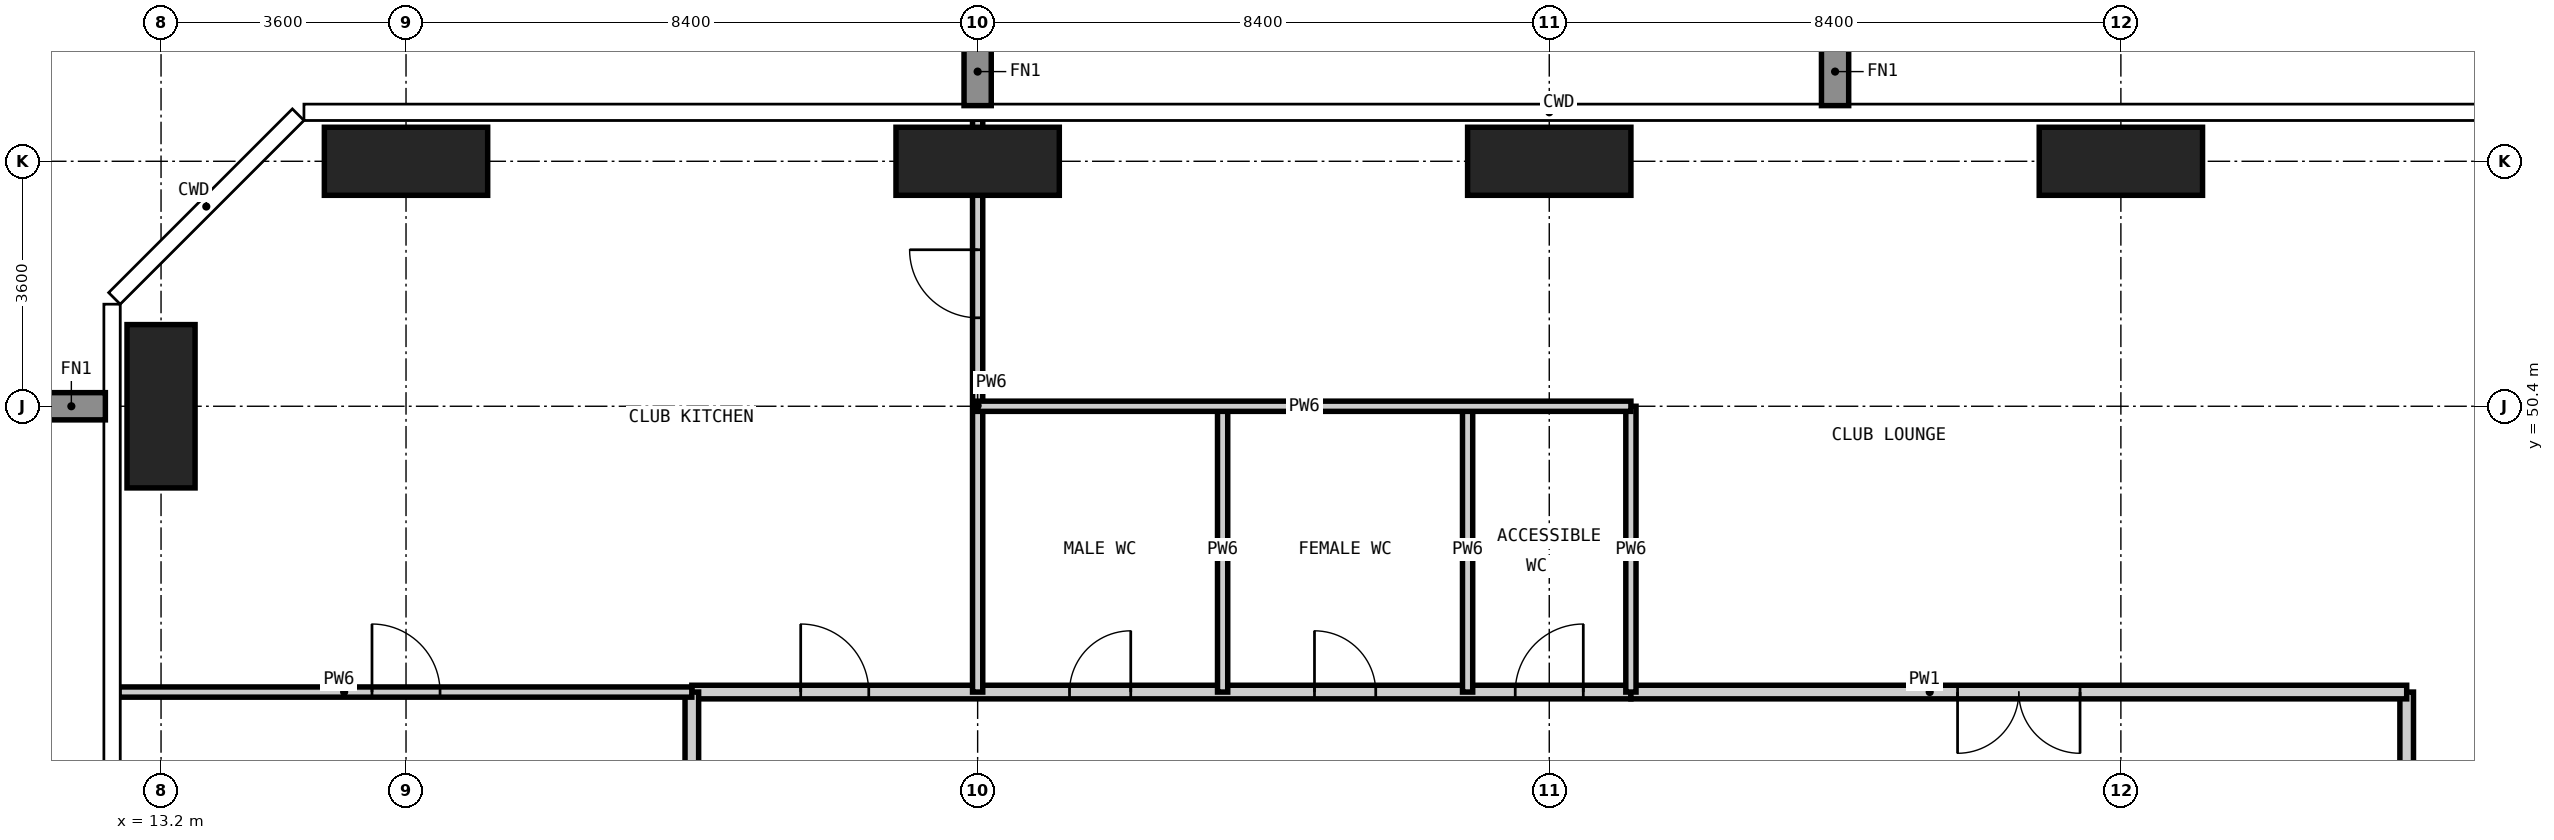
"""IFC4 building model, lengths in metres.
Left out: names, types, materials, properties, quantities, classifications, styles, units other than length and angle.
Written with IfcOpenShell. Run it as: python <this file> out.ifc"""

import sys

from ifc_helpers import new_model, si_unit, direction, frame, frame_2d, origin, origin_2d, place, context, subcontext, project, spatial, rectangle, extrude, element, fill, save


model = new_model("IFC4")
c1 = context("Model", 3, precision=1e-05, world=origin(), true_north=direction((0.0, 1.0)))
c2 = subcontext(c1, "Body", "Model", "MODEL_VIEW")
j1 = project(units=[si_unit("LENGTHUNIT", "METRE"), si_unit("PLANEANGLEUNIT", "RADIAN")], contexts=[c1])
p1 = place(None, origin())
s1 = spatial("IfcSite", under=j1, at=p1, CompositionType="ELEMENT")
p2 = place(p1, origin())
s2 = spatial("IfcBuilding", under=s1, at=p2, CompositionType="ELEMENT")
p3 = place(p2, frame((0.0, 0.0, 284.1)))
s3 = spatial("IfcBuildingStorey", under=s2, at=p3, CompositionType="ELEMENT", Elevation=284.1)
p4 = place(p3, frame((13.2, 50.4, -0.35), z_axis=(0.0, 0.0, 1.0), x_axis=(1.0, 0.0, 0.0)))
e1 = element("IfcColumn", 1, at=p4, inside=s3, PredefinedType="COLUMN", context=c2, shape_type="SweptSolid", body=[
    extrude(rectangle(XDim=1.0, YDim=2.4, at=origin_2d()), origin(), (0.0, 0.0, 1.0), 5.0),
])
for number, where, z_axis, x_axis in (
    (2, (16.8, 54.0, -0.35), (0.0, 0.0, 1.0), (1.0, 0.0, 0.0)),
    (3, (25.2, 54.0, -0.35), (0.0, 0.0, 1.0), (1.0, 0.0, 0.0)),
    (4, (33.6, 54.0, -0.35), (0.0, 0.0, 1.0), (1.0, 0.0, 0.0)),
    (5, (42.0, 54.0, -0.35), (0.0, 0.0, 1.0), (1.0, 0.0, 0.0)),
):
    element("IfcColumn", number, at=place(p3, frame(where, z_axis=z_axis, x_axis=x_axis)), inside=s3, PredefinedType="COLUMN", context=c2, shape_type="SweptSolid", body=[
        extrude(rectangle(XDim=2.4, YDim=1.0, at=origin_2d()), origin(), (0.0, 0.0, 1.0), 5.0),
    ])
p5 = place(p3, frame((46.2, 33.6, 0.0), z_axis=(0.0, 0.0, 1.0), x_axis=(0.0, 1.0, 0.0)))
e6 = element("IfcWall", 6, at=p5, inside=s3, PredefinedType="PARTITIONING", context=c2, shape_type="SweptSolid", body=[
    extrude(rectangle(XDim=12.6, YDim=0.2, at=frame_2d((6.3, 0.0))), origin(), (0.0, 0.0, 1.0), 4.65),
])
p6 = place(p5, frame((5.4, 0.0, 0.0)))
e7 = element("IfcOpeningElement", 7, at=p6, cuts=e6, PredefinedType="OPENING", context=c2, shape_type="SweptSolid", body=[
    extrude(rectangle(XDim=1.8, YDim=2.4, at=frame_2d((0.9, 1.2))), frame((0.0, 0.11, 0.0), z_axis=(0.0, -1.0, 0.0), x_axis=(1.0, 0.0, 0.0)), (0.0, 0.0, 1.0), 0.22),
])
p7 = place(p3, frame((21.0, 46.2, 0.0), z_axis=(0.0, 0.0, 1.0), x_axis=(1.0, 0.0, 0.0)))
e8 = element("IfcWall", 8, at=p7, inside=s3, PredefinedType="PARTITIONING", context=c2, shape_type="SweptSolid", body=[
    extrude(rectangle(XDim=13.8, YDim=0.2, at=frame_2d((6.9, 0.0))), origin(), (0.0, 0.0, 1.0), 4.65),
])
p8 = place(p7, frame((1.6, 0.0, 0.0)))
e9 = element("IfcOpeningElement", 9, at=p8, cuts=e8, PredefinedType="OPENING", context=c2, shape_type="SweptSolid", body=[
    extrude(rectangle(XDim=1.0, YDim=2.1, at=frame_2d((0.5, 1.05))), frame((0.0, 0.11, 0.0), z_axis=(0.0, -1.0, 0.0), x_axis=(1.0, 0.0, 0.0)), (0.0, 0.0, 1.0), 0.22),
])
p9 = place(p7, frame((5.55, 0.0, 0.0)))
e10 = element("IfcOpeningElement", 10, at=p9, cuts=e8, PredefinedType="OPENING", context=c2, shape_type="SweptSolid", body=[
    extrude(rectangle(XDim=0.9, YDim=2.1, at=frame_2d((0.45, 1.05))), frame((0.0, 0.11, 0.0), z_axis=(0.0, -1.0, 0.0), x_axis=(1.0, 0.0, 0.0)), (0.0, 0.0, 1.0), 0.22),
])
p10 = place(p7, frame((9.15, 0.0, 0.0)))
e11 = element("IfcOpeningElement", 11, at=p10, cuts=e8, PredefinedType="OPENING", context=c2, shape_type="SweptSolid", body=[
    extrude(rectangle(XDim=0.9, YDim=2.1, at=frame_2d((0.45, 1.05))), frame((0.0, 0.11, 0.0), z_axis=(0.0, -1.0, 0.0), x_axis=(1.0, 0.0, 0.0)), (0.0, 0.0, 1.0), 0.22),
])
p11 = place(p7, frame((12.1, 0.0, 0.0)))
e12 = element("IfcOpeningElement", 12, at=p11, cuts=e8, PredefinedType="OPENING", context=c2, shape_type="SweptSolid", body=[
    extrude(rectangle(XDim=1.0, YDim=2.1, at=frame_2d((0.5, 1.05))), frame((0.0, 0.11, 0.0), z_axis=(0.0, -1.0, 0.0), x_axis=(1.0, 0.0, 0.0)), (0.0, 0.0, 1.0), 0.22),
])
p12 = place(p3, frame((21.0, 46.2, 0.0), z_axis=(0.0, 0.0, 1.0), x_axis=(0.0, -1.0, 0.0)))
e13 = element("IfcWall", 13, at=p12, inside=s3, PredefinedType="PARTITIONING", context=c2, shape_type="SweptSolid", body=[
    extrude(rectangle(XDim=12.6, YDim=0.2, at=frame_2d((6.3, 0.0))), origin(), (0.0, 0.0, 1.0), 4.65),
])
p13 = place(p12, frame((5.4, 0.0, 0.0)))
e14 = element("IfcOpeningElement", 14, at=p13, cuts=e13, PredefinedType="OPENING", context=c2, shape_type="SweptSolid", body=[
    extrude(rectangle(XDim=1.8, YDim=2.4, at=frame_2d((0.9, 1.2))), frame((0.0, 0.11, 0.0), z_axis=(0.0, -1.0, 0.0), x_axis=(1.0, 0.0, 0.0)), (0.0, 0.0, 1.0), 0.22),
])
p14 = place(p3, frame((46.2, 46.2, 0.0), z_axis=(0.0, 0.0, 1.0), x_axis=(-1.0, 0.0, 0.0)))
e15 = element("IfcWall", 15, at=p14, inside=s3, PredefinedType="PARTITIONING", context=c2, shape_type="SweptSolid", body=[
    extrude(rectangle(XDim=11.4, YDim=0.2, at=frame_2d((5.7, 0.0))), origin(), (0.0, 0.0, 1.0), 4.65),
])
p15 = place(p14, frame((4.8, 0.0, 0.0)))
e16 = element("IfcOpeningElement", 16, at=p15, cuts=e15, PredefinedType="OPENING", context=c2, shape_type="SweptSolid", body=[
    extrude(rectangle(XDim=1.8, YDim=2.4, at=frame_2d((0.9, 1.2))), frame((0.0, 0.11, 0.0), z_axis=(0.0, -1.0, 0.0), x_axis=(1.0, 0.0, 0.0)), (0.0, 0.0, 1.0), 0.22),
])
p16 = place(p3, frame((25.2, 46.2, 0.0), z_axis=(0.0, 0.0, 1.0), x_axis=(0.0, 1.0, 0.0)))
e17 = element("IfcWall", 17, at=p16, inside=s3, PredefinedType="PARTITIONING", context=c2, shape_type="SweptSolid", body=[
    extrude(rectangle(XDim=8.418, YDim=0.15, at=frame_2d((4.209, 0.0))), origin(), (0.0, 0.0, 1.0), 4.65),
])
p17 = place(p16, frame((5.5, 0.0, 0.0)))
e18 = element("IfcOpeningElement", 18, at=p17, cuts=e17, PredefinedType="OPENING", context=c2, shape_type="SweptSolid", body=[
    extrude(rectangle(XDim=1.0, YDim=2.1, at=frame_2d((0.5, 1.05))), frame((0.0, 0.085, 0.0), z_axis=(0.0, -1.0, 0.0), x_axis=(1.0, 0.0, 0.0)), (0.0, 0.0, 1.0), 0.17),
])
for number, where, z_axis, x_axis in (
    (19, (28.8, 46.2, 0.0), (0.0, 0.0, 1.0), (0.0, 1.0, 0.0)),
    (20, (32.4, 46.2, 0.0), (0.0, 0.0, 1.0), (0.0, 1.0, 0.0)),
    (21, (34.8, 46.2, 0.0), (0.0, 0.0, 1.0), (0.0, 1.0, 0.0)),
):
    element("IfcWall", number, at=place(p3, frame(where, z_axis=z_axis, x_axis=x_axis)), inside=s3, PredefinedType="PARTITIONING", context=c2, shape_type="SweptSolid", body=[
        extrude(rectangle(XDim=4.2, YDim=0.15, at=frame_2d((2.1, 0.0))), origin(), (0.0, 0.0, 1.0), 4.65),
    ])
p18 = place(p3, frame((12.582, 46.2, 0.0), z_axis=(0.0, 0.0, 1.0), x_axis=(1.0, 0.0, 0.0)))
e22 = element("IfcWall", 22, at=p18, inside=s3, PredefinedType="PARTITIONING", context=c2, shape_type="SweptSolid", body=[
    extrude(rectangle(XDim=8.418, YDim=0.15, at=frame_2d((4.209, 0.0))), origin(), (0.0, 0.0, 1.0), 4.65),
])
p19 = place(p18, frame((3.718, 0.0, 0.0)))
e23 = element("IfcOpeningElement", 23, at=p19, cuts=e22, PredefinedType="OPENING", context=c2, shape_type="SweptSolid", body=[
    extrude(rectangle(XDim=1.0, YDim=2.1, at=frame_2d((0.5, 1.05))), frame((0.0, 0.085, 0.0), z_axis=(0.0, -1.0, 0.0), x_axis=(1.0, 0.0, 0.0)), (0.0, 0.0, 1.0), 0.17),
])
p20 = place(p3, frame((25.2, 50.4, 0.0), z_axis=(0.0, 0.0, 1.0), x_axis=(1.0, 0.0, 0.0)))
e24 = element("IfcWall", 24, at=p20, inside=s3, PredefinedType="PARTITIONING", context=c2, shape_type="SweptSolid", body=[
    extrude(rectangle(XDim=9.6, YDim=0.15, at=frame_2d((4.8, 0.0))), origin(), (0.0, 0.0, 1.0), 4.65),
])
p21 = place(p15, origin())
e25 = element("IfcDoor", 25, at=p21, inside=s3, OperationType="DOUBLE_DOOR_DOUBLE_SWING", PredefinedType="DOOR", context=c2, shape_type="SweptSolid", body=[
    extrude(rectangle(XDim=1.8, YDim=2.4, at=frame_2d((0.9, 1.2))), frame((0.0, 0.025, 0.0), z_axis=(0.0, -1.0, 0.0), x_axis=(1.0, 0.0, 0.0)), (0.0, 0.0, 1.0), 0.05),
])
fill(e16, e25)
p22 = place(p17, origin())
e26 = element("IfcDoor", 26, at=p22, inside=s3, OperationType="SINGLE_SWING_RIGHT", PredefinedType="DOOR", context=c2, shape_type="SweptSolid", body=[
    extrude(rectangle(XDim=1.0, YDim=2.1, at=frame_2d((0.5, 1.05))), frame((0.0, 0.025, 0.0), z_axis=(0.0, -1.0, 0.0), x_axis=(1.0, 0.0, 0.0)), (0.0, 0.0, 1.0), 0.05),
])
fill(e18, e26)
p23 = place(p19, origin())
e27 = element("IfcDoor", 27, at=p23, inside=s3, OperationType="SINGLE_SWING_LEFT", PredefinedType="DOOR", context=c2, shape_type="SweptSolid", body=[
    extrude(rectangle(XDim=1.0, YDim=2.1, at=frame_2d((0.5, 1.05))), frame((0.0, 0.025, 0.0), z_axis=(0.0, -1.0, 0.0), x_axis=(1.0, 0.0, 0.0)), (0.0, 0.0, 1.0), 0.05),
])
fill(e23, e27)
p24 = place(p8, origin())
e28 = element("IfcDoor", 28, at=p24, inside=s3, OperationType="SINGLE_SWING_LEFT", PredefinedType="DOOR", context=c2, shape_type="SweptSolid", body=[
    extrude(rectangle(XDim=1.0, YDim=2.1, at=frame_2d((0.5, 1.05))), frame((0.0, 0.025, 0.0), z_axis=(0.0, -1.0, 0.0), x_axis=(1.0, 0.0, 0.0)), (0.0, 0.0, 1.0), 0.05),
])
fill(e9, e28)
p25 = place(p9, origin())
e29 = element("IfcDoor", 29, at=p25, inside=s3, OperationType="SINGLE_SWING_RIGHT", PredefinedType="DOOR", context=c2, shape_type="SweptSolid", body=[
    extrude(rectangle(XDim=0.9, YDim=2.1, at=frame_2d((0.45, 1.05))), frame((0.0, 0.025, 0.0), z_axis=(0.0, -1.0, 0.0), x_axis=(1.0, 0.0, 0.0)), (0.0, 0.0, 1.0), 0.05),
])
fill(e10, e29)
p26 = place(p10, origin())
e30 = element("IfcDoor", 30, at=p26, inside=s3, OperationType="SINGLE_SWING_LEFT", PredefinedType="DOOR", context=c2, shape_type="SweptSolid", body=[
    extrude(rectangle(XDim=0.9, YDim=2.1, at=frame_2d((0.45, 1.05))), frame((0.0, 0.025, 0.0), z_axis=(0.0, -1.0, 0.0), x_axis=(1.0, 0.0, 0.0)), (0.0, 0.0, 1.0), 0.05),
])
fill(e11, e30)
p27 = place(p11, origin())
e31 = element("IfcDoor", 31, at=p27, inside=s3, OperationType="SINGLE_SWING_RIGHT", PredefinedType="DOOR", context=c2, shape_type="SweptSolid", body=[
    extrude(rectangle(XDim=1.0, YDim=2.1, at=frame_2d((0.5, 1.05))), frame((0.0, 0.025, 0.0), z_axis=(0.0, -1.0, 0.0), x_axis=(1.0, 0.0, 0.0)), (0.0, 0.0, 1.0), 0.05),
])
fill(e12, e31)
save(model, sys.argv[1])
